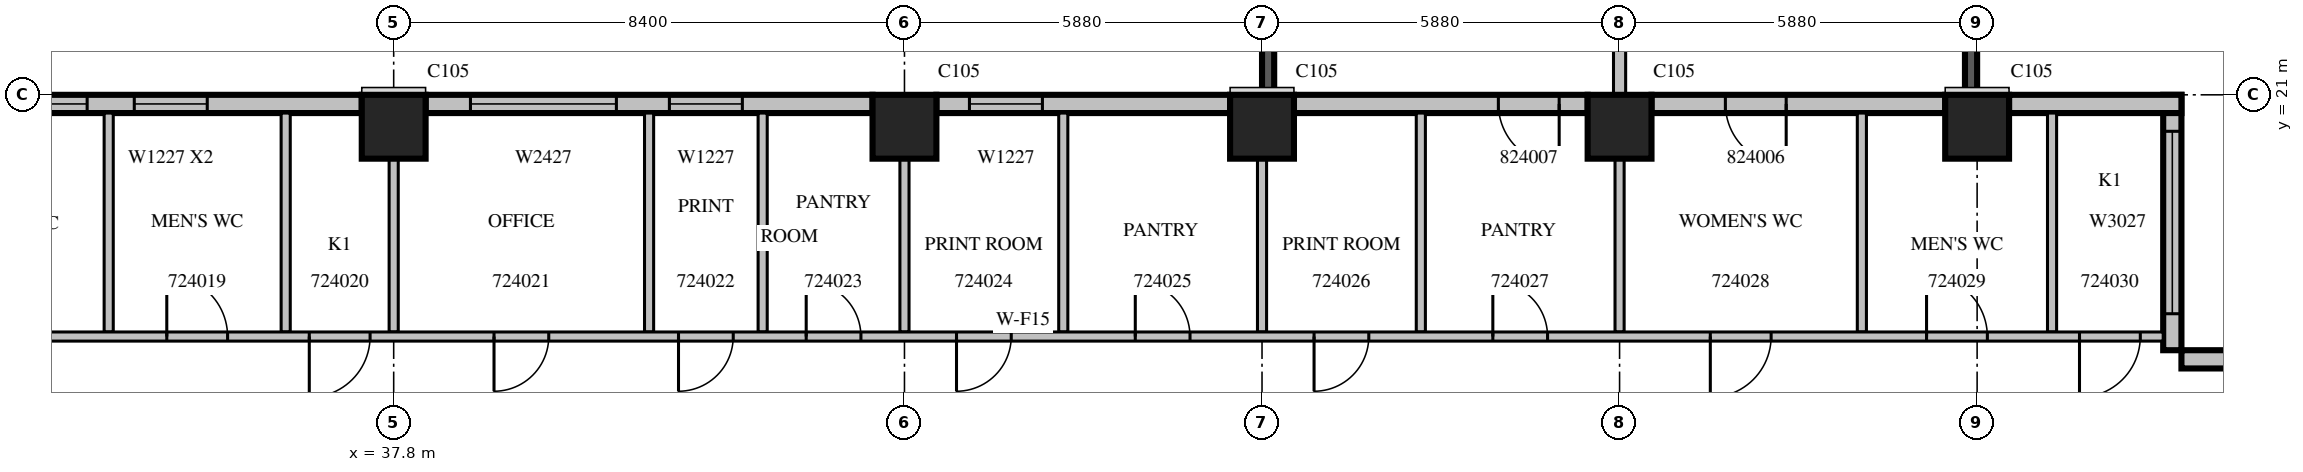
"""IFC4 building model, lengths in metres.
Left out: names, types, materials, properties, quantities, classifications, styles, units other than length and angle.
Written with IfcOpenShell. Run it as: python <this file> out.ifc"""

import sys

from ifc_helpers import new_model, si_unit, direction, frame, frame_2d, origin, origin_2d, place, context, subcontext, project, spatial, rectangle, extrude, source, transform, mapped, element, fill, save


model = new_model("IFC4")
c1 = context("Model", 3, precision=1e-05, world=origin(), true_north=direction((0.0, 1.0)))
c2 = subcontext(c1, "Body", "Model", "MODEL_VIEW")
j1 = project(units=[si_unit("LENGTHUNIT", "METRE"), si_unit("PLANEANGLEUNIT", "RADIAN")], contexts=[c1])
p1 = place(None, origin())
s1 = spatial("IfcSite", under=j1, at=p1, CompositionType="ELEMENT")
p2 = place(p1, origin())
s2 = spatial("IfcBuilding", under=s1, at=p2, CompositionType="ELEMENT")
p3 = place(p2, frame((0.0, 0.0, 111.9)))
s3 = spatial("IfcBuildingStorey", under=s2, at=p3, CompositionType="ELEMENT", Elevation=111.9)
m1 = source(origin(), c2, "Body", "SweptSolid", [
    extrude(rectangle(XDim=1.05, YDim=1.05, at=origin_2d()), origin(), (0.0, 0.0, 1.0), 4.2),
])
for number, where, z_axis, x_axis in (
    (1, (37.8, 20.475, 0.0), (0.0, 0.0, 1.0), (1.0, 0.0, 0.0)),
    (2, (46.2, 20.475, 0.0), (0.0, 0.0, 1.0), (1.0, 0.0, 0.0)),
    (3, (52.08, 20.475, 0.0), (0.0, 0.0, 1.0), (1.0, 0.0, 0.0)),
    (4, (57.96, 20.475, 0.0), (0.0, 0.0, 1.0), (1.0, 0.0, 0.0)),
    (5, (63.84, 20.475, 0.0), (0.0, 0.0, 1.0), (1.0, 0.0, 0.0)),
):
    element("IfcColumn", number, at=place(p3, frame(where, z_axis=z_axis, x_axis=x_axis)), inside=s3, PredefinedType="COLUMN", context=c2, shape_type="MappedRepresentation", body=[
        mapped(m1, transform((0.0, 0.0, 0.0), scale=1.0)),
    ])
m2 = source(origin(), c2, "Body", "SweptSolid", [
    extrude(rectangle(XDim=4.2, YDim=0.3, at=frame_2d((2.1, 0.0))), origin(), (0.0, 0.0, 1.0), 3.8),
])
p4 = place(p3, frame((71.4, 16.65, 0.0), z_axis=(0.0, 0.0, 1.0), x_axis=(-1.0, 0.0, 0.0)))
e6 = element("IfcWall", 6, at=p4, inside=s3, PredefinedType="STANDARD", context=c2, shape_type="MappedRepresentation", body=[
    mapped(m2, transform((0.0, 0.0, 0.0), scale=1.0)),
])
m3 = source(origin(), c2, "Body", "SweptSolid", [
    extrude(rectangle(XDim=1.2, YDim=2.7, at=frame_2d((0.6, 1.35))), frame((0.0, 0.16, 0.0), z_axis=(0.0, -1.0, 0.0), x_axis=(1.0, 0.0, 0.0)), (0.0, 0.0, 1.0), 0.32),
])
p5 = place(p4, frame((0.66, 0.0, 0.6)))
e7 = element("IfcOpeningElement", 7, at=p5, cuts=e6, PredefinedType="OPENING", context=c2, shape_type="MappedRepresentation", body=[
    mapped(m3, transform((0.0, 0.0, 0.0), scale=1.0)),
])
p6 = place(p3, frame((67.05, 16.8, 0.0), z_axis=(0.0, 0.0, 1.0), x_axis=(0.0, 1.0, 0.0)))
e8 = element("IfcWall", 8, at=p6, inside=s3, PredefinedType="STANDARD", context=c2, shape_type="MappedRepresentation", body=[
    mapped(m2, transform((0.0, 0.0, 0.0), scale=1.0)),
])
m4 = source(origin(), c2, "Body", "SweptSolid", [
    extrude(rectangle(XDim=3.0, YDim=2.7, at=frame_2d((1.5, 1.35))), frame((0.0, 0.16, 0.0), z_axis=(0.0, -1.0, 0.0), x_axis=(1.0, 0.0, 0.0)), (0.0, 0.0, 1.0), 0.32),
])
p7 = place(p6, frame((0.6, 0.0, 0.6)))
e9 = element("IfcOpeningElement", 9, at=p7, cuts=e8, PredefinedType="OPENING", context=c2, shape_type="MappedRepresentation", body=[
    mapped(m4, transform((0.0, 0.0, 0.0), scale=1.0)),
])
m5 = source(origin(), c2, "Body", "SweptSolid", [
    extrude(rectangle(XDim=2.835, YDim=0.3, at=frame_2d((1.417, 0.0))), origin(), (0.0, 0.0, 1.0), 3.8),
])
p8 = place(p3, frame((67.2, 20.85, 0.0), z_axis=(0.0, 0.0, 1.0), x_axis=(-1.0, 0.0, 0.0)))
e10 = element("IfcWall", 10, at=p8, inside=s3, PredefinedType="STANDARD", context=c2, shape_type="MappedRepresentation", body=[
    mapped(m5, transform((0.0, 0.0, 0.0), scale=1.0)),
])
m6 = source(origin(), c2, "Body", "SweptSolid", [
    extrude(rectangle(XDim=4.83, YDim=0.3, at=frame_2d((2.415, 0.0))), origin(), (0.0, 0.0, 1.0), 3.8),
])
p9 = place(p3, frame((63.315, 20.85, 0.0), z_axis=(0.0, 0.0, 1.0), x_axis=(-1.0, 0.0, 0.0)))
e11 = element("IfcWall", 11, at=p9, inside=s3, PredefinedType="STANDARD", context=c2, shape_type="MappedRepresentation", body=[
    mapped(m6, transform((0.0, 0.0, 0.0), scale=1.0)),
])
m7 = source(origin(), c2, "Body", "SweptSolid", [
    extrude(rectangle(XDim=1.0, YDim=2.1, at=frame_2d((0.5, 1.05))), frame((0.0, 0.16, 0.0), z_axis=(0.0, -1.0, 0.0), x_axis=(1.0, 0.0, 0.0)), (0.0, 0.0, 1.0), 0.32),
])
p10 = place(p9, frame((2.615, 0.0, 0.0)))
e12 = element("IfcOpeningElement", 12, at=p10, cuts=e11, PredefinedType="OPENING", context=c2, shape_type="MappedRepresentation", body=[
    mapped(m7, transform((0.0, 0.0, 0.0), scale=1.0)),
])
p11 = place(p3, frame((57.435, 20.85, 0.0), z_axis=(0.0, 0.0, 1.0), x_axis=(-1.0, 0.0, 0.0)))
e13 = element("IfcWall", 13, at=p11, inside=s3, PredefinedType="STANDARD", context=c2, shape_type="MappedRepresentation", body=[
    mapped(m6, transform((0.0, 0.0, 0.0), scale=1.0)),
])
p12 = place(p11, frame((0.468, 0.0, 0.0)))
e14 = element("IfcOpeningElement", 14, at=p12, cuts=e13, PredefinedType="OPENING", context=c2, shape_type="MappedRepresentation", body=[
    mapped(m7, transform((0.0, 0.0, 0.0), scale=1.0)),
])
p13 = place(p3, frame((51.555, 20.85, 0.0), z_axis=(0.0, 0.0, 1.0), x_axis=(-1.0, 0.0, 0.0)))
e15 = element("IfcWall", 15, at=p13, inside=s3, PredefinedType="STANDARD", context=c2, shape_type="MappedRepresentation", body=[
    mapped(m6, transform((0.0, 0.0, 0.0), scale=1.0)),
])
p14 = place(p13, frame((3.087, 0.0, 0.6)))
e16 = element("IfcOpeningElement", 16, at=p14, cuts=e15, PredefinedType="OPENING", context=c2, shape_type="MappedRepresentation", body=[
    mapped(m3, transform((0.0, 0.0, 0.0), scale=1.0)),
])
m8 = source(origin(), c2, "Body", "SweptSolid", [
    extrude(rectangle(XDim=7.35, YDim=0.3, at=frame_2d((3.675, 0.0))), origin(), (0.0, 0.0, 1.0), 3.8),
])
p15 = place(p3, frame((45.675, 20.85, 0.0), z_axis=(0.0, 0.0, 1.0), x_axis=(-1.0, 0.0, 0.0)))
e17 = element("IfcWall", 17, at=p15, inside=s3, PredefinedType="STANDARD", context=c2, shape_type="MappedRepresentation", body=[
    mapped(m8, transform((0.0, 0.0, 0.0), scale=1.0)),
])
p16 = place(p15, frame((2.141, 0.0, 0.6)))
e18 = element("IfcOpeningElement", 18, at=p16, cuts=e17, PredefinedType="OPENING", context=c2, shape_type="MappedRepresentation", body=[
    mapped(m3, transform((0.0, 0.0, 0.0), scale=1.0)),
])
m9 = source(origin(), c2, "Body", "SweptSolid", [
    extrude(rectangle(XDim=2.4, YDim=2.7, at=frame_2d((1.2, 1.35))), frame((0.0, 0.16, 0.0), z_axis=(0.0, -1.0, 0.0), x_axis=(1.0, 0.0, 0.0)), (0.0, 0.0, 1.0), 0.32),
])
p17 = place(p15, frame((4.213, 0.0, 0.6)))
e19 = element("IfcOpeningElement", 19, at=p17, cuts=e17, PredefinedType="OPENING", context=c2, shape_type="MappedRepresentation", body=[
    mapped(m9, transform((0.0, 0.0, 0.0), scale=1.0)),
])
p18 = place(p3, frame((37.275, 20.85, 0.0), z_axis=(0.0, 0.0, 1.0), x_axis=(-1.0, 0.0, 0.0)))
e20 = element("IfcWall", 20, at=p18, inside=s3, PredefinedType="STANDARD", context=c2, shape_type="MappedRepresentation", body=[
    mapped(m8, transform((0.0, 0.0, 0.0), scale=1.0)),
])
p19 = place(p18, frame((2.541, 0.0, 0.6)))
e21 = element("IfcOpeningElement", 21, at=p19, cuts=e20, PredefinedType="OPENING", context=c2, shape_type="MappedRepresentation", body=[
    mapped(m3, transform((0.0, 0.0, 0.0), scale=1.0)),
])
p20 = place(p18, frame((4.516, 0.0, 0.6)))
e22 = element("IfcOpeningElement", 22, at=p20, cuts=e20, PredefinedType="OPENING", context=c2, shape_type="MappedRepresentation", body=[
    mapped(m3, transform((0.0, 0.0, 0.0), scale=1.0)),
])
m10 = source(origin(), c2, "Body", "SweptSolid", [
    extrude(rectangle(XDim=3.9, YDim=0.2, at=frame_2d((1.95, 0.0))), origin(), (0.0, 0.0, 1.0), 3.79),
])
p21 = place(p3, frame((57.96, 21.0, 0.0), z_axis=(0.0, 0.0, 1.0), x_axis=(0.0, 1.0, 0.0)))
e23 = element("IfcWall", 23, at=p21, inside=s3, PredefinedType="SOLIDWALL", context=c2, shape_type="MappedRepresentation", body=[
    mapped(m10, transform((0.0, 0.0, 0.0), scale=1.0)),
])
m11 = source(origin(), c2, "Body", "SweptSolid", [
    extrude(rectangle(XDim=3.9, YDim=0.2, at=frame_2d((1.95, 0.0))), origin(), (0.0, 0.0, 1.0), 3.79),
])
p22 = place(p3, frame((63.74, 21.0, 0.0), z_axis=(0.0, 0.0, 1.0), x_axis=(0.0, 1.0, 0.0)))
e24 = element("IfcWall", 24, at=p22, inside=s3, PredefinedType="SOLIDWALL", context=c2, shape_type="MappedRepresentation", body=[
    mapped(m11, transform((0.0, 0.0, 0.0), scale=1.0)),
])
m12 = source(origin(), c2, "Body", "SweptSolid", [
    extrude(rectangle(XDim=2.4, YDim=2.7, at=frame_2d((1.2, 1.35))), frame((0.0, 0.11, 0.0), z_axis=(0.0, -1.0, 0.0), x_axis=(1.0, 0.0, 0.0)), (0.0, 0.0, 1.0), 0.22),
])
p23 = place(p22, frame((0.75, 0.0, 0.6)))
e25 = element("IfcOpeningElement", 25, at=p23, cuts=e24, PredefinedType="OPENING", context=c2, shape_type="MappedRepresentation", body=[
    mapped(m12, transform((0.0, 0.0, 0.0), scale=1.0)),
])
p24 = place(p3, frame((52.18, 21.0, 0.0), z_axis=(0.0, 0.0, 1.0), x_axis=(0.0, 1.0, 0.0)))
e26 = element("IfcWall", 26, at=p24, inside=s3, PredefinedType="SOLIDWALL", context=c2, shape_type="MappedRepresentation", body=[
    mapped(m11, transform((0.0, 0.0, 0.0), scale=1.0)),
])
p25 = place(p24, frame((0.75, 0.0, 0.6)))
e27 = element("IfcOpeningElement", 27, at=p25, cuts=e26, PredefinedType="OPENING", context=c2, shape_type="MappedRepresentation", body=[
    mapped(m12, transform((0.0, 0.0, 0.0), scale=1.0)),
])
m13 = source(origin(), c2, "Body", "SweptSolid", [
    extrude(rectangle(XDim=3.6, YDim=0.15, at=frame_2d((1.8, 0.0))), origin(), (0.0, 0.0, 1.0), 3.8),
])
for number, where, z_axis, x_axis in (
    (28, (33.113, 20.7, 0.0), (0.0, 0.0, 1.0), (0.0, -1.0, 0.0)),
    (29, (36.024, 20.7, 0.0), (0.0, 0.0, 1.0), (0.0, -1.0, 0.0)),
    (30, (43.868, 20.7, 0.0), (0.0, 0.0, 1.0), (0.0, -1.0, 0.0)),
    (31, (48.812, 20.7, 0.0), (0.0, 0.0, 1.0), (0.0, -1.0, 0.0)),
    (32, (54.692, 20.7, 0.0), (0.0, 0.0, 1.0), (0.0, -1.0, 0.0)),
    (33, (61.944, 20.7, 0.0), (0.0, 0.0, 1.0), (0.0, -1.0, 0.0)),
    (34, (65.072, 20.7, 0.0), (0.0, 0.0, 1.0), (0.0, -1.0, 0.0)),
):
    element("IfcWall", number, at=place(p3, frame(where, z_axis=z_axis, x_axis=x_axis)), inside=s3, PredefinedType="PARTITIONING", context=c2, shape_type="MappedRepresentation", body=[
        mapped(m13, transform((0.0, 0.0, 0.0), scale=1.0)),
    ])
m14 = source(origin(), c2, "Body", "SweptSolid", [
    extrude(rectangle(XDim=2.851, YDim=0.15, at=frame_2d((1.425, 0.0))), origin(), (0.0, 0.0, 1.0), 3.8),
])
p26 = place(p3, frame((37.8, 17.1, 0.0), z_axis=(0.0, 0.0, 1.0), x_axis=(0.0, 1.0, 0.0)))
e35 = element("IfcWall", 35, at=p26, inside=s3, PredefinedType="PARTITIONING", context=c2, shape_type="MappedRepresentation", body=[
    mapped(m14, transform((0.0, 0.0, 0.0), scale=1.0)),
])
p27 = place(p3, frame((42.0, 17.1, 0.0), z_axis=(0.0, 0.0, 1.0), x_axis=(0.0, 1.0, 0.0)))
e36 = element("IfcWall", 36, at=p27, inside=s3, PredefinedType="PARTITIONING", context=c2, shape_type="MappedRepresentation", body=[
    mapped(m13, transform((0.0, 0.0, 0.0), scale=1.0)),
])
for number, where, z_axis, x_axis in (
    (37, (46.2, 17.1, 0.0), (0.0, 0.0, 1.0), (0.0, 1.0, 0.0)),
    (38, (52.08, 17.1, 0.0), (0.0, 0.0, 1.0), (0.0, 1.0, 0.0)),
    (39, (57.96, 17.1, 0.0), (0.0, 0.0, 1.0), (0.0, 1.0, 0.0)),
):
    element("IfcWall", number, at=place(p3, frame(where, z_axis=z_axis, x_axis=x_axis)), inside=s3, PredefinedType="PARTITIONING", context=c2, shape_type="MappedRepresentation", body=[
        mapped(m14, transform((0.0, 0.0, 0.0), scale=1.0)),
    ])
m15 = source(origin(), c2, "Body", "SweptSolid", [
    extrude(rectangle(XDim=37.5, YDim=0.15, at=frame_2d((18.75, 0.0))), origin(), (0.0, 0.0, 1.0), 3.8),
])
p28 = place(p3, frame((29.4, 17.025, 0.0), z_axis=(0.0, 0.0, 1.0), x_axis=(1.0, 0.0, 0.0)))
e40 = element("IfcWall", 40, at=p28, inside=s3, PredefinedType="PARTITIONING", context=c2, shape_type="MappedRepresentation", body=[
    mapped(m15, transform((0.0, 0.0, 0.0), scale=1.0)),
])
m16 = source(origin(), c2, "Body", "SweptSolid", [
    extrude(rectangle(XDim=1.0, YDim=2.1, at=frame_2d((0.5, 1.05))), frame((0.0, 0.085, 0.0), z_axis=(0.0, -1.0, 0.0), x_axis=(1.0, 0.0, 0.0)), (0.0, 0.0, 1.0), 0.17),
])
p29 = place(p28, frame((1.357, 0.0, 0.0)))
e41 = element("IfcOpeningElement", 41, at=p29, cuts=e40, PredefinedType="OPENING", context=c2, shape_type="MappedRepresentation", body=[
    mapped(m16, transform((0.0, 0.0, 0.0), scale=1.0)),
])
p30 = place(p28, frame((4.669, 0.0, 0.0)))
e42 = element("IfcOpeningElement", 42, at=p30, cuts=e40, PredefinedType="OPENING", context=c2, shape_type="MappedRepresentation", body=[
    mapped(m16, transform((0.0, 0.0, 0.0), scale=1.0)),
])
p31 = place(p28, frame((7.012, 0.0, 0.0)))
e43 = element("IfcOpeningElement", 43, at=p31, cuts=e40, PredefinedType="OPENING", context=c2, shape_type="MappedRepresentation", body=[
    mapped(m16, transform((0.0, 0.0, 0.0), scale=1.0)),
])
m17 = source(origin(), c2, "Body", "SweptSolid", [
    extrude(rectangle(XDim=0.9, YDim=2.1, at=frame_2d((0.45, 1.05))), frame((0.0, 0.085, 0.0), z_axis=(0.0, -1.0, 0.0), x_axis=(1.0, 0.0, 0.0)), (0.0, 0.0, 1.0), 0.17),
])
p32 = place(p28, frame((10.05, 0.0, 0.0)))
e44 = element("IfcOpeningElement", 44, at=p32, cuts=e40, PredefinedType="OPENING", context=c2, shape_type="MappedRepresentation", body=[
    mapped(m17, transform((0.0, 0.0, 0.0), scale=1.0)),
])
p33 = place(p28, frame((13.084, 0.0, 0.0)))
e45 = element("IfcOpeningElement", 45, at=p33, cuts=e40, PredefinedType="OPENING", context=c2, shape_type="MappedRepresentation", body=[
    mapped(m17, transform((0.0, 0.0, 0.0), scale=1.0)),
])
p34 = place(p28, frame((15.184, 0.0, 0.0)))
e46 = element("IfcOpeningElement", 46, at=p34, cuts=e40, PredefinedType="OPENING", context=c2, shape_type="MappedRepresentation", body=[
    mapped(m17, transform((0.0, 0.0, 0.0), scale=1.0)),
])
p35 = place(p28, frame((17.656, 0.0, 0.0)))
e47 = element("IfcOpeningElement", 47, at=p35, cuts=e40, PredefinedType="OPENING", context=c2, shape_type="MappedRepresentation", body=[
    mapped(m17, transform((0.0, 0.0, 0.0), scale=1.0)),
])
p36 = place(p28, frame((20.596, 0.0, 0.0)))
e48 = element("IfcOpeningElement", 48, at=p36, cuts=e40, PredefinedType="OPENING", context=c2, shape_type="MappedRepresentation", body=[
    mapped(m17, transform((0.0, 0.0, 0.0), scale=1.0)),
])
p37 = place(p28, frame((23.536, 0.0, 0.0)))
e49 = element("IfcOpeningElement", 49, at=p37, cuts=e40, PredefinedType="OPENING", context=c2, shape_type="MappedRepresentation", body=[
    mapped(m17, transform((0.0, 0.0, 0.0), scale=1.0)),
])
p38 = place(p28, frame((26.476, 0.0, 0.0)))
e50 = element("IfcOpeningElement", 50, at=p38, cuts=e40, PredefinedType="OPENING", context=c2, shape_type="MappedRepresentation", body=[
    mapped(m17, transform((0.0, 0.0, 0.0), scale=1.0)),
])
p39 = place(p28, frame((30.052, 0.0, 0.0)))
e51 = element("IfcOpeningElement", 51, at=p39, cuts=e40, PredefinedType="OPENING", context=c2, shape_type="MappedRepresentation", body=[
    mapped(m16, transform((0.0, 0.0, 0.0), scale=1.0)),
])
p40 = place(p28, frame((33.608, 0.0, 0.0)))
e52 = element("IfcOpeningElement", 52, at=p40, cuts=e40, PredefinedType="OPENING", context=c2, shape_type="MappedRepresentation", body=[
    mapped(m16, transform((0.0, 0.0, 0.0), scale=1.0)),
])
p41 = place(p28, frame((36.124, 0.0, 0.0)))
e53 = element("IfcOpeningElement", 53, at=p41, cuts=e40, PredefinedType="OPENING", context=c2, shape_type="MappedRepresentation", body=[
    mapped(m16, transform((0.0, 0.0, 0.0), scale=1.0)),
])
m18 = source(origin(), c2, "Body", "SweptSolid", [
    extrude(rectangle(XDim=3.0, YDim=2.7, at=frame_2d((1.5, 1.35))), frame((0.0, 0.03, 0.0), z_axis=(0.0, -1.0, 0.0), x_axis=(1.0, 0.0, 0.0)), (0.0, 0.0, 1.0), 0.06),
])
p42 = place(p7, origin())
e54 = element("IfcWindow", 54, at=p42, inside=s3, PartitioningType="SINGLE_PANEL", PredefinedType="WINDOW", context=c2, shape_type="MappedRepresentation", body=[
    mapped(m18, transform((0.0, 0.0, 0.0), scale=1.0)),
])
fill(e9, e54)
m19 = source(origin(), c2, "Body", "SweptSolid", [
    extrude(rectangle(XDim=1.2, YDim=2.7, at=frame_2d((0.6, 1.35))), frame((0.0, 0.03, 0.0), z_axis=(0.0, -1.0, 0.0), x_axis=(1.0, 0.0, 0.0)), (0.0, 0.0, 1.0), 0.06),
])
p43 = place(p14, origin())
e55 = element("IfcWindow", 55, at=p43, inside=s3, PartitioningType="SINGLE_PANEL", PredefinedType="WINDOW", context=c2, shape_type="MappedRepresentation", body=[
    mapped(m19, transform((0.0, 0.0, 0.0), scale=1.0)),
])
fill(e16, e55)
p44 = place(p19, origin())
e56 = element("IfcWindow", 56, at=p44, inside=s3, PartitioningType="SINGLE_PANEL", PredefinedType="WINDOW", context=c2, shape_type="MappedRepresentation", body=[
    mapped(m19, transform((0.0, 0.0, 0.0), scale=1.0)),
])
fill(e21, e56)
p45 = place(p20, origin())
e57 = element("IfcWindow", 57, at=p45, inside=s3, PartitioningType="SINGLE_PANEL", PredefinedType="WINDOW", context=c2, shape_type="MappedRepresentation", body=[
    mapped(m19, transform((0.0, 0.0, 0.0), scale=1.0)),
])
fill(e22, e57)
p46 = place(p16, origin())
e58 = element("IfcWindow", 58, at=p46, inside=s3, PartitioningType="SINGLE_PANEL", PredefinedType="WINDOW", context=c2, shape_type="MappedRepresentation", body=[
    mapped(m19, transform((0.0, 0.0, 0.0), scale=1.0)),
])
fill(e18, e58)
m20 = source(origin(), c2, "Body", "SweptSolid", [
    extrude(rectangle(XDim=2.4, YDim=2.7, at=frame_2d((1.2, 1.35))), frame((0.0, 0.03, 0.0), z_axis=(0.0, -1.0, 0.0), x_axis=(1.0, 0.0, 0.0)), (0.0, 0.0, 1.0), 0.06),
])
p47 = place(p17, origin())
e59 = element("IfcWindow", 59, at=p47, inside=s3, PartitioningType="SINGLE_PANEL", PredefinedType="WINDOW", context=c2, shape_type="MappedRepresentation", body=[
    mapped(m20, transform((0.0, 0.0, 0.0), scale=1.0)),
])
fill(e19, e59)
m21 = source(origin(), c2, "Body", "SweptSolid", [
    extrude(rectangle(XDim=1.0, YDim=2.1, at=frame_2d((0.5, 1.05))), frame((0.0, 0.025, 0.0), z_axis=(0.0, -1.0, 0.0), x_axis=(1.0, 0.0, 0.0)), (0.0, 0.0, 1.0), 0.05),
])
p48 = place(p30, origin())
e60 = element("IfcDoor", 60, at=p48, inside=s3, OperationType="SINGLE_SWING_LEFT", PredefinedType="DOOR", context=c2, shape_type="MappedRepresentation", body=[
    mapped(m21, transform((0.0, 0.0, 0.0), scale=1.0)),
])
fill(e42, e60)
p49 = place(p31, origin())
e61 = element("IfcDoor", 61, at=p49, inside=s3, OperationType="SINGLE_SWING_RIGHT", PredefinedType="DOOR", context=c2, shape_type="MappedRepresentation", body=[
    mapped(m21, transform((0.0, 0.0, 0.0), scale=1.0)),
])
fill(e43, e61)
m22 = source(origin(), c2, "Body", "SweptSolid", [
    extrude(rectangle(XDim=0.9, YDim=2.1, at=frame_2d((0.45, 1.05))), frame((0.0, 0.025, 0.0), z_axis=(0.0, -1.0, 0.0), x_axis=(1.0, 0.0, 0.0)), (0.0, 0.0, 1.0), 0.05),
])
p50 = place(p32, origin())
e62 = element("IfcDoor", 62, at=p50, inside=s3, OperationType="SINGLE_SWING_RIGHT", PredefinedType="DOOR", context=c2, shape_type="MappedRepresentation", body=[
    mapped(m22, transform((0.0, 0.0, 0.0), scale=1.0)),
])
fill(e44, e62)
p51 = place(p33, origin())
e63 = element("IfcDoor", 63, at=p51, inside=s3, OperationType="SINGLE_SWING_RIGHT", PredefinedType="DOOR", context=c2, shape_type="MappedRepresentation", body=[
    mapped(m22, transform((0.0, 0.0, 0.0), scale=1.0)),
])
fill(e45, e63)
p52 = place(p34, origin())
e64 = element("IfcDoor", 64, at=p52, inside=s3, OperationType="SINGLE_SWING_LEFT", PredefinedType="DOOR", context=c2, shape_type="MappedRepresentation", body=[
    mapped(m22, transform((0.0, 0.0, 0.0), scale=1.0)),
])
fill(e46, e64)
p53 = place(p35, origin())
e65 = element("IfcDoor", 65, at=p53, inside=s3, OperationType="SINGLE_SWING_RIGHT", PredefinedType="DOOR", context=c2, shape_type="MappedRepresentation", body=[
    mapped(m22, transform((0.0, 0.0, 0.0), scale=1.0)),
])
fill(e47, e65)
p54 = place(p36, origin())
e66 = element("IfcDoor", 66, at=p54, inside=s3, OperationType="SINGLE_SWING_LEFT", PredefinedType="DOOR", context=c2, shape_type="MappedRepresentation", body=[
    mapped(m22, transform((0.0, 0.0, 0.0), scale=1.0)),
])
fill(e48, e66)
p55 = place(p37, origin())
e67 = element("IfcDoor", 67, at=p55, inside=s3, OperationType="SINGLE_SWING_RIGHT", PredefinedType="DOOR", context=c2, shape_type="MappedRepresentation", body=[
    mapped(m22, transform((0.0, 0.0, 0.0), scale=1.0)),
])
fill(e49, e67)
p56 = place(p38, origin())
e68 = element("IfcDoor", 68, at=p56, inside=s3, OperationType="SINGLE_SWING_LEFT", PredefinedType="DOOR", context=c2, shape_type="MappedRepresentation", body=[
    mapped(m22, transform((0.0, 0.0, 0.0), scale=1.0)),
])
fill(e50, e68)
p57 = place(p39, origin())
e69 = element("IfcDoor", 69, at=p57, inside=s3, OperationType="SINGLE_SWING_RIGHT", PredefinedType="DOOR", context=c2, shape_type="MappedRepresentation", body=[
    mapped(m21, transform((0.0, 0.0, 0.0), scale=1.0)),
])
fill(e51, e69)
p58 = place(p40, origin())
e70 = element("IfcDoor", 70, at=p58, inside=s3, OperationType="SINGLE_SWING_LEFT", PredefinedType="DOOR", context=c2, shape_type="MappedRepresentation", body=[
    mapped(m21, transform((0.0, 0.0, 0.0), scale=1.0)),
])
fill(e52, e70)
p59 = place(p41, origin())
e71 = element("IfcDoor", 71, at=p59, inside=s3, OperationType="SINGLE_SWING_RIGHT", PredefinedType="DOOR", context=c2, shape_type="MappedRepresentation", body=[
    mapped(m21, transform((0.0, 0.0, 0.0), scale=1.0)),
])
fill(e53, e71)
p60 = place(p10, origin())
e72 = element("IfcDoor", 72, at=p60, inside=s3, OperationType="SINGLE_SWING_LEFT", PredefinedType="DOOR", context=c2, shape_type="MappedRepresentation", body=[
    mapped(m21, transform((0.0, 0.0, 0.0), scale=1.0)),
])
fill(e12, e72)
p61 = place(p12, origin())
e73 = element("IfcDoor", 73, at=p61, inside=s3, OperationType="SINGLE_SWING_LEFT", PredefinedType="DOOR", context=c2, shape_type="MappedRepresentation", body=[
    mapped(m21, transform((0.0, 0.0, 0.0), scale=1.0)),
])
fill(e14, e73)
save(model, sys.argv[1])
